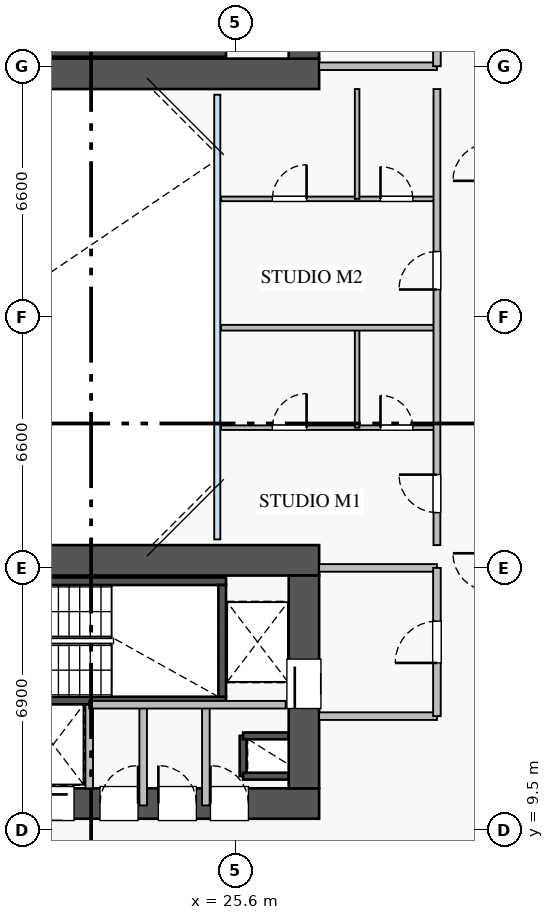
"""IFC4 building model, lengths in metres.
Left out: names, types, materials, properties, quantities, classifications, styles, units other than length and angle.
Written with IfcOpenShell. Run it as: python <this file> out.ifc"""

import sys

from ifc_helpers import new_model, si_unit, direction, frame, frame_2d, origin, place, context, subcontext, project, spatial, rectangle, extrude, source, transform, mapped, element, fill, save


model = new_model("IFC4")
c1 = context("Model", 3, precision=1e-05, world=origin(), true_north=direction((0.0, 1.0)))
c2 = subcontext(c1, "Body", "Model", "MODEL_VIEW")
j1 = project(units=[si_unit("LENGTHUNIT", "METRE"), si_unit("PLANEANGLEUNIT", "RADIAN")], contexts=[c1])
p1 = place(None, origin())
s1 = spatial("IfcSite", under=j1, at=p1, CompositionType="ELEMENT")
p2 = place(p1, origin())
s2 = spatial("IfcBuilding", under=s1, at=p2, CompositionType="ELEMENT")
p3 = place(p2, frame((0.0, 0.0, 23.0)))
s3 = spatial("IfcBuildingStorey", under=s2, at=p3, CompositionType="ELEMENT", Elevation=23.0)
p4 = place(p3, frame((25.8, 10.92, 0.0), z_axis=(0.0, 0.0, 1.0), x_axis=(0.0, 1.0, 0.0)))
e1 = element("IfcWall", 1, at=p4, inside=s3, PredefinedType="SHEAR", context=c2, shape_type="SweptSolid", body=[
    extrude(rectangle(XDim=1.06, YDim=0.18, at=frame_2d((0.53, 0.0))), origin(), (0.0, 0.0, 1.0), 3.07),
])
for number, where, z_axis, x_axis in (
    (2, (25.8, 11.98, 0.0), (0.0, 0.0, 1.0), (1.0, 0.0, 0.0)),
    (3, (25.8, 10.92, 0.0), (0.0, 0.0, 1.0), (1.0, 0.0, 0.0)),
):
    element("IfcWall", number, at=place(p3, frame(where, z_axis=z_axis, x_axis=x_axis)), inside=s3, PredefinedType="SHEAR", context=c2, shape_type="SweptSolid", body=[
        extrude(rectangle(XDim=1.2, YDim=0.18, at=frame_2d((0.6, 0.0))), origin(), (0.0, 0.0, 1.0), 3.07),
    ])
p5 = place(p3, frame((19.88, 12.8, 0.0), z_axis=(0.0, 0.0, 1.0), x_axis=(1.0, 0.0, 0.0)))
e4 = element("IfcWall", 4, at=p5, inside=s3, PredefinedType="SHEAR", context=c2, shape_type="SweptSolid", body=[
    extrude(rectangle(XDim=1.87, YDim=0.18, at=frame_2d((0.935, 0.0))), origin(), (0.0, 0.0, 1.0), 3.07),
])
p6 = place(p3, frame((18.2, 29.95, 0.0), z_axis=(0.0, 0.0, 1.0), x_axis=(1.0, 0.0, 0.0)))
e5 = element("IfcWall", 5, at=p6, inside=s3, PredefinedType="SHEAR", context=c2, shape_type="SweptSolid", body=[
    extrude(rectangle(XDim=7.15, YDim=0.2, at=frame_2d((3.575, 0.0))), origin(), (0.0, 0.0, 1.0), 3.25),
])
p7 = place(p3, frame((18.2, 12.91, 0.0), z_axis=(0.0, 0.0, 1.0), x_axis=(1.0, 0.0, 0.0)))
e6 = element("IfcWall", 6, at=p7, inside=s3, PredefinedType="SHEAR", context=c2, shape_type="SweptSolid", body=[
    extrude(rectangle(XDim=7.15, YDim=0.2, at=frame_2d((3.575, 0.0))), origin(), (0.0, 0.0, 1.0), 3.25),
])
p8 = place(p7, frame((0.35, 0.0, 0.0)))
e7 = element("IfcOpeningElement", 7, at=p8, cuts=e6, PredefinedType="OPENING", context=c2, shape_type="SweptSolid", body=[
    extrude(rectangle(XDim=1.1, YDim=2.05, at=frame_2d((0.55, 1.025))), frame((0.0, 0.11, 0.0), z_axis=(0.0, -1.0, 0.0), x_axis=(1.0, 0.0, 0.0)), (0.0, 0.0, 1.0), 0.22),
])
p9 = place(p3, frame((18.2, 16.05, 0.0), z_axis=(0.0, 0.0, 1.0), x_axis=(1.0, 0.0, 0.0)))
e8 = element("IfcWall", 8, at=p9, inside=s3, PredefinedType="SHEAR", context=c2, shape_type="SweptSolid", body=[
    extrude(rectangle(XDim=7.15, YDim=0.2, at=frame_2d((3.575, 0.0))), origin(), (0.0, 0.0, 1.0), 3.25),
])
p10 = place(p3, frame((25.25, 13.01, 0.0), z_axis=(0.0, 0.0, 1.0), x_axis=(0.0, 1.0, 0.0)))
e9 = element("IfcWall", 9, at=p10, inside=s3, PredefinedType="SHEAR", context=c2, shape_type="SweptSolid", body=[
    extrude(rectangle(XDim=2.94, YDim=0.2, at=frame_2d((1.47, 0.0))), origin(), (0.0, 0.0, 1.0), 3.25),
])
p11 = place(p3, frame((10.2, 29.4, 0.0), z_axis=(0.0, 0.0, 1.0), x_axis=(1.0, 0.0, 0.0)))
e10 = element("IfcWall", 10, at=p11, inside=s3, PredefinedType="SHEAR", context=c2, shape_type="SweptSolid", body=[
    extrude(rectangle(XDim=17.6, YDim=0.8, at=frame_2d((8.8, 0.0))), origin(), (0.0, 0.0, 1.0), 3.25),
])
p12 = place(p3, frame((27.4, 29.8, 0.0), z_axis=(0.0, 0.0, 1.0), x_axis=(0.0, 1.0, 0.0)))
e11 = element("IfcWall", 11, at=p12, inside=s3, PredefinedType="SHEAR", context=c2, shape_type="SweptSolid", body=[
    extrude(rectangle(XDim=5.6, YDim=0.8, at=frame_2d((2.8, 0.0))), origin(), (0.0, 0.0, 1.0), 3.25),
])
p13 = place(p12, frame((1.1, 0.0, 0.0)))
e12 = element("IfcOpeningElement", 12, at=p13, cuts=e11, PredefinedType="OPENING", context=c2, shape_type="SweptSolid", body=[
    extrude(rectangle(XDim=1.3, YDim=2.05, at=frame_2d((0.65, 1.025))), frame((0.0, 0.41, 0.0), z_axis=(0.0, -1.0, 0.0), x_axis=(1.0, 0.0, 0.0)), (0.0, 0.0, 1.0), 0.82),
])
p14 = place(p3, frame((10.2, 10.2, 0.0), z_axis=(0.0, 0.0, 1.0), x_axis=(1.0, 0.0, 0.0)))
e13 = element("IfcWall", 13, at=p14, inside=s3, PredefinedType="SHEAR", context=c2, shape_type="SweptSolid", body=[
    extrude(rectangle(XDim=17.6, YDim=0.8, at=frame_2d((8.8, 0.0))), origin(), (0.0, 0.0, 1.0), 3.25),
])
p15 = place(p14, frame((1.15, 0.0, 0.0)))
e14 = element("IfcOpeningElement", 14, at=p15, cuts=e13, PredefinedType="OPENING", context=c2, shape_type="SweptSolid", body=[
    extrude(rectangle(XDim=1.1, YDim=2.05, at=frame_2d((0.55, 1.025))), frame((0.0, 0.41, 0.0), z_axis=(0.0, -1.0, 0.0), x_axis=(1.0, 0.0, 0.0)), (0.0, 0.0, 1.0), 0.82),
])
p16 = place(p14, frame((8.3, 0.0, 0.0)))
e15 = element("IfcOpeningElement", 15, at=p16, cuts=e13, PredefinedType="OPENING", context=c2, shape_type="SweptSolid", body=[
    extrude(rectangle(XDim=1.1, YDim=2.05, at=frame_2d((0.55, 1.025))), frame((0.0, 0.41, 0.0), z_axis=(0.0, -1.0, 0.0), x_axis=(1.0, 0.0, 0.0)), (0.0, 0.0, 1.0), 0.82),
])
p17 = place(p14, frame((10.05, 0.0, 0.0)))
e16 = element("IfcOpeningElement", 16, at=p17, cuts=e13, PredefinedType="OPENING", context=c2, shape_type="SweptSolid", body=[
    extrude(rectangle(XDim=1.1, YDim=2.05, at=frame_2d((0.55, 1.025))), frame((0.0, 0.41, 0.0), z_axis=(0.0, -1.0, 0.0), x_axis=(1.0, 0.0, 0.0)), (0.0, 0.0, 1.0), 0.82),
])
p18 = place(p14, frame((14.74, 0.0, 0.0)))
e17 = element("IfcOpeningElement", 17, at=p18, cuts=e13, PredefinedType="OPENING", context=c2, shape_type="SweptSolid", body=[
    extrude(rectangle(XDim=1.0, YDim=2.05, at=frame_2d((0.5, 1.025))), frame((0.0, 0.41, 0.0), z_axis=(0.0, -1.0, 0.0), x_axis=(1.0, 0.0, 0.0)), (0.0, 0.0, 1.0), 0.82),
])
p19 = place(p14, frame((11.835, 0.0, 0.0)))
e18 = element("IfcOpeningElement", 18, at=p19, cuts=e13, PredefinedType="OPENING", context=c2, shape_type="SweptSolid", body=[
    extrude(rectangle(XDim=1.0, YDim=2.05, at=frame_2d((0.5, 1.025))), frame((0.0, 0.41, 0.0), z_axis=(0.0, -1.0, 0.0), x_axis=(1.0, 0.0, 0.0)), (0.0, 0.0, 1.0), 0.82),
])
p20 = place(p14, frame((13.37, 0.0, 0.0)))
e19 = element("IfcOpeningElement", 19, at=p20, cuts=e13, PredefinedType="OPENING", context=c2, shape_type="SweptSolid", body=[
    extrude(rectangle(XDim=1.0, YDim=2.05, at=frame_2d((0.5, 1.025))), frame((0.0, 0.41, 0.0), z_axis=(0.0, -1.0, 0.0), x_axis=(1.0, 0.0, 0.0)), (0.0, 0.0, 1.0), 0.82),
])
p21 = place(p3, frame((10.2, 16.6, 0.0), z_axis=(0.0, 0.0, 1.0), x_axis=(1.0, 0.0, 0.0)))
e20 = element("IfcWall", 20, at=p21, inside=s3, PredefinedType="SHEAR", context=c2, shape_type="SweptSolid", body=[
    extrude(rectangle(XDim=17.6, YDim=0.8, at=frame_2d((8.8, 0.0))), origin(), (0.0, 0.0, 1.0), 3.25),
])
p22 = place(p3, frame((27.4, 10.6, 0.0), z_axis=(0.0, 0.0, 1.0), x_axis=(0.0, 1.0, 0.0)))
e21 = element("IfcWall", 21, at=p22, inside=s3, PredefinedType="SHEAR", context=c2, shape_type="SweptSolid", body=[
    extrude(rectangle(XDim=5.6, YDim=0.8, at=frame_2d((2.8, 0.0))), origin(), (0.0, 0.0, 1.0), 3.25),
])
p23 = place(p22, frame((2.1, 0.0, 0.0)))
e22 = element("IfcOpeningElement", 22, at=p23, cuts=e21, PredefinedType="OPENING", context=c2, shape_type="SweptSolid", body=[
    extrude(rectangle(XDim=1.3, YDim=2.05, at=frame_2d((0.65, 1.025))), frame((0.0, 0.41, 0.0), z_axis=(0.0, -1.0, 0.0), x_axis=(1.0, 0.0, 0.0)), (0.0, 0.0, 1.0), 0.82),
])
p24 = place(p3, frame((27.8, 29.6, 0.0), z_axis=(0.0, 0.0, 1.0), x_axis=(1.0, 0.0, 0.0)))
e23 = element("IfcWall", 23, at=p24, inside=s3, PredefinedType="PARTITIONING", context=c2, shape_type="SweptSolid", body=[
    extrude(rectangle(XDim=3.1, YDim=0.2, at=frame_2d((1.55, 0.0))), origin(), (0.0, 0.0, 1.0), 3.07),
])
p25 = place(p3, frame((30.9, 29.6, 0.0), z_axis=(0.0, 0.0, 1.0), x_axis=(0.0, 1.0, 0.0)))
e24 = element("IfcWall", 24, at=p25, inside=s3, PredefinedType="PARTITIONING", context=c2, shape_type="SweptSolid", body=[
    extrude(rectangle(XDim=3.9, YDim=0.2, at=frame_2d((1.95, 0.0))), origin(), (0.0, 0.0, 1.0), 3.07),
])
p26 = place(p25, frame((1.4, 0.0, 0.0)))
e25 = element("IfcOpeningElement", 25, at=p26, cuts=e24, PredefinedType="OPENING", context=c2, shape_type="SweptSolid", body=[
    extrude(rectangle(XDim=1.1, YDim=2.05, at=frame_2d((0.55, 1.025))), frame((0.0, 0.11, 0.0), z_axis=(0.0, -1.0, 0.0), x_axis=(1.0, 0.0, 0.0)), (0.0, 0.0, 1.0), 0.22),
])
for number, where, z_axis, x_axis in (
    (26, (27.8, 16.4, 0.0), (0.0, 0.0, 1.0), (1.0, 0.0, 0.0)),
    (27, (27.8, 12.5, 0.0), (0.0, 0.0, 1.0), (1.0, 0.0, 0.0)),
):
    element("IfcWall", number, at=place(p3, frame(where, z_axis=z_axis, x_axis=x_axis)), inside=s3, PredefinedType="PARTITIONING", context=c2, shape_type="SweptSolid", body=[
        extrude(rectangle(XDim=3.1, YDim=0.2, at=frame_2d((1.55, 0.0))), origin(), (0.0, 0.0, 1.0), 3.07),
    ])
p27 = place(p3, frame((30.9, 12.5, 0.0), z_axis=(0.0, 0.0, 1.0), x_axis=(0.0, 1.0, 0.0)))
e28 = element("IfcWall", 28, at=p27, inside=s3, PredefinedType="PARTITIONING", context=c2, shape_type="SweptSolid", body=[
    extrude(rectangle(XDim=3.9, YDim=0.2, at=frame_2d((1.95, 0.0))), origin(), (0.0, 0.0, 1.0), 3.07),
])
p28 = place(p27, frame((1.4, 0.0, 0.0)))
e29 = element("IfcOpeningElement", 29, at=p28, cuts=e28, PredefinedType="OPENING", context=c2, shape_type="SweptSolid", body=[
    extrude(rectangle(XDim=1.1, YDim=2.05, at=frame_2d((0.55, 1.025))), frame((0.0, 0.11, 0.0), z_axis=(0.0, -1.0, 0.0), x_axis=(1.0, 0.0, 0.0)), (0.0, 0.0, 1.0), 0.22),
])
p29 = place(p3, frame((24.82, 10.15, 0.0), z_axis=(0.0, 0.0, 1.0), x_axis=(0.0, 1.0, 0.0)))
e30 = element("IfcWall", 30, at=p29, inside=s3, PredefinedType="PARTITIONING", context=c2, shape_type="SweptSolid", body=[
    extrude(rectangle(XDim=2.65, YDim=0.2, at=frame_2d((1.325, 0.0))), origin(), (0.0, 0.0, 1.0), 3.07),
])
p30 = place(p3, frame((21.75, 10.6, 0.0), z_axis=(0.0, 0.0, 1.0), x_axis=(0.0, 1.0, 0.0)))
e31 = element("IfcWall", 31, at=p30, inside=s3, PredefinedType="PARTITIONING", context=c2, shape_type="SweptSolid", body=[
    extrude(rectangle(XDim=2.2, YDim=0.2, at=frame_2d((1.1, 0.0))), origin(), (0.0, 0.0, 1.0), 3.07),
])
p31 = place(p3, frame((23.17, 10.15, 0.0), z_axis=(0.0, 0.0, 1.0), x_axis=(0.0, 1.0, 0.0)))
e32 = element("IfcWall", 32, at=p31, inside=s3, PredefinedType="PARTITIONING", context=c2, shape_type="SweptSolid", body=[
    extrude(rectangle(XDim=2.65, YDim=0.2, at=frame_2d((1.325, 0.0))), origin(), (0.0, 0.0, 1.0), 3.07),
])
p32 = place(p3, frame((21.75, 12.8, 0.0), z_axis=(0.0, 0.0, 1.0), x_axis=(1.0, 0.0, 0.0)))
e33 = element("IfcWall", 33, at=p32, inside=s3, PredefinedType="PARTITIONING", context=c2, shape_type="SweptSolid", body=[
    extrude(rectangle(XDim=5.17, YDim=0.2, at=frame_2d((2.585, 0.0))), origin(), (0.0, 0.0, 1.0), 3.07),
])
p33 = place(p3, frame((25.22, 20.09, 0.0), z_axis=(0.0, 0.0, 1.0), x_axis=(1.0, 0.0, 0.0)))
e34 = element("IfcWall", 34, at=p33, inside=s3, PredefinedType="PLUMBINGWALL", context=c2, shape_type="SweptSolid", body=[
    extrude(rectangle(XDim=5.68, YDim=0.12, at=frame_2d((2.84, 0.0))), origin(), (0.0, 0.0, 1.0), 2.625),
])
p34 = place(p33, frame((1.35, 0.0, 0.0)))
e35 = element("IfcOpeningElement", 35, at=p34, cuts=e34, PredefinedType="OPENING", context=c2, shape_type="SweptSolid", body=[
    extrude(rectangle(XDim=0.9, YDim=2.05, at=frame_2d((0.45, 1.025))), frame((0.0, 0.07, 0.0), z_axis=(0.0, -1.0, 0.0), x_axis=(1.0, 0.0, 0.0)), (0.0, 0.0, 1.0), 0.14),
])
p35 = place(p33, frame((4.195, 0.0, 0.0)))
e36 = element("IfcOpeningElement", 36, at=p35, cuts=e34, PredefinedType="OPENING", context=c2, shape_type="SweptSolid", body=[
    extrude(rectangle(XDim=0.85, YDim=2.05, at=frame_2d((0.425, 1.025))), frame((0.0, 0.07, 0.0), z_axis=(0.0, -1.0, 0.0), x_axis=(1.0, 0.0, 0.0)), (0.0, 0.0, 1.0), 0.14),
])
p36 = place(p3, frame((28.8, 20.09, 0.0), z_axis=(0.0, 0.0, 1.0), x_axis=(0.0, 1.0, 0.0)))
e37 = element("IfcWall", 37, at=p36, inside=s3, PredefinedType="PLUMBINGWALL", context=c2, shape_type="SweptSolid", body=[
    extrude(rectangle(XDim=2.63, YDim=0.12, at=frame_2d((1.315, 0.0))), origin(), (0.0, 0.0, 1.0), 3.07),
])
p37 = place(p3, frame((25.22, 26.11, 0.0), z_axis=(0.0, 0.0, 1.0), x_axis=(1.0, 0.0, 0.0)))
e38 = element("IfcWall", 38, at=p37, inside=s3, PredefinedType="PLUMBINGWALL", context=c2, shape_type="SweptSolid", body=[
    extrude(rectangle(XDim=5.68, YDim=0.12, at=frame_2d((2.84, 0.0))), origin(), (0.0, 0.0, 1.0), 2.625),
])
p38 = place(p37, frame((1.35, 0.0, 0.0)))
e39 = element("IfcOpeningElement", 39, at=p38, cuts=e38, PredefinedType="OPENING", context=c2, shape_type="SweptSolid", body=[
    extrude(rectangle(XDim=0.9, YDim=2.05, at=frame_2d((0.45, 1.025))), frame((0.0, 0.07, 0.0), z_axis=(0.0, -1.0, 0.0), x_axis=(1.0, 0.0, 0.0)), (0.0, 0.0, 1.0), 0.14),
])
p39 = place(p37, frame((4.195, 0.0, 0.0)))
e40 = element("IfcOpeningElement", 40, at=p39, cuts=e38, PredefinedType="OPENING", context=c2, shape_type="SweptSolid", body=[
    extrude(rectangle(XDim=0.85, YDim=2.05, at=frame_2d((0.425, 1.025))), frame((0.0, 0.07, 0.0), z_axis=(0.0, -1.0, 0.0), x_axis=(1.0, 0.0, 0.0)), (0.0, 0.0, 1.0), 0.14),
])
p40 = place(p3, frame((28.8, 26.11, 0.0), z_axis=(0.0, 0.0, 1.0), x_axis=(0.0, 1.0, 0.0)))
e41 = element("IfcWall", 41, at=p40, inside=s3, PredefinedType="PLUMBINGWALL", context=c2, shape_type="SweptSolid", body=[
    extrude(rectangle(XDim=2.89, YDim=0.12, at=frame_2d((1.445, 0.0))), origin(), (0.0, 0.0, 1.0), 3.07),
])
p41 = place(p3, frame((25.22, 22.72, 0.0), z_axis=(0.0, 0.0, 1.0), x_axis=(1.0, 0.0, 0.0)))
e42 = element("IfcWall", 42, at=p41, inside=s3, PredefinedType="PARTITIONING", context=c2, shape_type="SweptSolid", body=[
    extrude(rectangle(XDim=5.68, YDim=0.15, at=frame_2d((2.84, 0.0))), origin(), (0.0, 0.0, 1.0), 3.07),
])
p42 = place(p3, frame((30.9, 17.0, 0.0), z_axis=(0.0, 0.0, 1.0), x_axis=(0.0, 1.0, 0.0)))
e43 = element("IfcWall", 43, at=p42, inside=s3, PredefinedType="PARTITIONING", context=c2, shape_type="SweptSolid", body=[
    extrude(rectangle(XDim=12.0, YDim=0.18, at=frame_2d((6.0, 0.0))), origin(), (0.0, 0.0, 1.0), 3.07),
])
p43 = place(p42, frame((0.855, 0.0, 0.0)))
e44 = element("IfcOpeningElement", 44, at=p43, cuts=e43, PredefinedType="OPENING", context=c2, shape_type="SweptSolid", body=[
    extrude(rectangle(XDim=1.0, YDim=2.05, at=frame_2d((0.5, 1.025))), frame((0.0, 0.1, 0.0), z_axis=(0.0, -1.0, 0.0), x_axis=(1.0, 0.0, 0.0)), (0.0, 0.0, 1.0), 0.2),
])
p44 = place(p42, frame((6.725, 0.0, 0.0)))
e45 = element("IfcOpeningElement", 45, at=p44, cuts=e43, PredefinedType="OPENING", context=c2, shape_type="SweptSolid", body=[
    extrude(rectangle(XDim=1.0, YDim=2.05, at=frame_2d((0.5, 1.025))), frame((0.0, 0.1, 0.0), z_axis=(0.0, -1.0, 0.0), x_axis=(1.0, 0.0, 0.0)), (0.0, 0.0, 1.0), 0.2),
])
m1 = source(origin(), c2, "Body", "SweptSolid", [
    extrude(rectangle(XDim=1.3, YDim=2.05, at=frame_2d((0.65, 1.025))), frame((0.0, 0.025, 0.0), z_axis=(0.0, -1.0, 0.0), x_axis=(1.0, 0.0, 0.0)), (0.0, 0.0, 1.0), 0.05),
])
p45 = place(p23, origin())
e46 = element("IfcDoor", 46, at=p45, inside=s3, OperationType="SLIDING_TO_RIGHT", PredefinedType="DOOR", context=c2, shape_type="MappedRepresentation", body=[
    mapped(m1, transform((0.0, 0.0, 0.0), x_axis=(1.0, 0.0, 0.0), y_axis=(0.0, 1.0, 0.0), z_axis=(0.0, 0.0, 1.0), scale=1.0)),
])
fill(e22, e46)
m2 = source(origin(), c2, "Body", "SweptSolid", [
    extrude(rectangle(XDim=1.1, YDim=2.05, at=frame_2d((0.55, 1.025))), frame((0.0, 0.025, 0.0), z_axis=(0.0, -1.0, 0.0), x_axis=(1.0, 0.0, 0.0)), (0.0, 0.0, 1.0), 0.05),
])
p46 = place(p17, origin())
e47 = element("IfcDoor", 47, at=p46, inside=s3, OperationType="SLIDING_TO_RIGHT", PredefinedType="DOOR", context=c2, shape_type="MappedRepresentation", body=[
    mapped(m2, transform((0.0, 0.0, 0.0), x_axis=(1.0, 0.0, 0.0), y_axis=(0.0, 1.0, 0.0), z_axis=(0.0, 0.0, 1.0), scale=1.0)),
])
fill(e16, e47)
m3 = source(origin(), c2, "Body", "SweptSolid", [
    extrude(rectangle(XDim=1.0, YDim=2.05, at=frame_2d((0.5, 1.025))), frame((0.0, 0.025, 0.0), z_axis=(0.0, -1.0, 0.0), x_axis=(1.0, 0.0, 0.0)), (0.0, 0.0, 1.0), 0.05),
])
p47 = place(p18, origin())
e48 = element("IfcDoor", 48, at=p47, inside=s3, OperationType="SINGLE_SWING_LEFT", PredefinedType="DOOR", context=c2, shape_type="MappedRepresentation", body=[
    mapped(m3, transform((0.0, 0.0, 0.0), x_axis=(1.0, 0.0, 0.0), y_axis=(0.0, 1.0, 0.0), z_axis=(0.0, 0.0, 1.0), scale=1.0)),
])
fill(e17, e48)
p48 = place(p19, origin())
e49 = element("IfcDoor", 49, at=p48, inside=s3, OperationType="SINGLE_SWING_RIGHT", PredefinedType="DOOR", context=c2, shape_type="MappedRepresentation", body=[
    mapped(m3, transform((0.0, 0.0, 0.0), x_axis=(1.0, 0.0, 0.0), y_axis=(0.0, 1.0, 0.0), z_axis=(0.0, 0.0, 1.0), scale=1.0)),
])
fill(e18, e49)
p49 = place(p20, origin())
e50 = element("IfcDoor", 50, at=p49, inside=s3, OperationType="SINGLE_SWING_LEFT", PredefinedType="DOOR", context=c2, shape_type="MappedRepresentation", body=[
    mapped(m3, transform((0.0, 0.0, 0.0), x_axis=(1.0, 0.0, 0.0), y_axis=(0.0, 1.0, 0.0), z_axis=(0.0, 0.0, 1.0), scale=1.0)),
])
fill(e19, e50)
p50 = place(p28, origin())
e51 = element("IfcDoor", 51, at=p50, inside=s3, OperationType="SINGLE_SWING_LEFT", PredefinedType="DOOR", context=c2, shape_type="MappedRepresentation", body=[
    mapped(m2, transform((0.0, 0.0, 0.0), x_axis=(1.0, 0.0, 0.0), y_axis=(0.0, 1.0, 0.0), z_axis=(0.0, 0.0, 1.0), scale=1.0)),
])
fill(e29, e51)
m4 = source(origin(), c2, "Body", "SweptSolid", [
    extrude(rectangle(XDim=0.9, YDim=2.05, at=frame_2d((0.45, 1.025))), frame((0.0, 0.025, 0.0), z_axis=(0.0, -1.0, 0.0), x_axis=(1.0, 0.0, 0.0)), (0.0, 0.0, 1.0), 0.05),
])
p51 = place(p34, origin())
e52 = element("IfcDoor", 52, at=p51, inside=s3, OperationType="SINGLE_SWING_RIGHT", PredefinedType="DOOR", context=c2, shape_type="MappedRepresentation", body=[
    mapped(m4, transform((0.0, 0.0, 0.0), x_axis=(1.0, 0.0, 0.0), y_axis=(0.0, 1.0, 0.0), z_axis=(0.0, 0.0, 1.0), scale=1.0)),
])
fill(e35, e52)
m5 = source(origin(), c2, "Body", "SweptSolid", [
    extrude(rectangle(XDim=0.85, YDim=2.05, at=frame_2d((0.425, 1.025))), frame((0.0, 0.025, 0.0), z_axis=(0.0, -1.0, 0.0), x_axis=(1.0, 0.0, 0.0)), (0.0, 0.0, 1.0), 0.05),
])
p52 = place(p35, origin())
e53 = element("IfcDoor", 53, at=p52, inside=s3, OperationType="SINGLE_SWING_LEFT", PredefinedType="DOOR", context=c2, shape_type="MappedRepresentation", body=[
    mapped(m5, transform((0.0, 0.0, 0.0), x_axis=(1.0, 0.0, 0.0), y_axis=(0.0, 1.0, 0.0), z_axis=(0.0, 0.0, 1.0), scale=1.0)),
])
fill(e36, e53)
p53 = place(p38, origin())
e54 = element("IfcDoor", 54, at=p53, inside=s3, OperationType="SINGLE_SWING_RIGHT", PredefinedType="DOOR", context=c2, shape_type="MappedRepresentation", body=[
    mapped(m4, transform((0.0, 0.0, 0.0), x_axis=(1.0, 0.0, 0.0), y_axis=(0.0, 1.0, 0.0), z_axis=(0.0, 0.0, 1.0), scale=1.0)),
])
fill(e39, e54)
p54 = place(p39, origin())
e55 = element("IfcDoor", 55, at=p54, inside=s3, OperationType="SINGLE_SWING_LEFT", PredefinedType="DOOR", context=c2, shape_type="MappedRepresentation", body=[
    mapped(m5, transform((0.0, 0.0, 0.0), x_axis=(1.0, 0.0, 0.0), y_axis=(0.0, 1.0, 0.0), z_axis=(0.0, 0.0, 1.0), scale=1.0)),
])
fill(e40, e55)
p55 = place(p43, origin())
e56 = element("IfcDoor", 56, at=p55, inside=s3, OperationType="SINGLE_SWING_RIGHT", PredefinedType="DOOR", context=c2, shape_type="MappedRepresentation", body=[
    mapped(m3, transform((0.0, 0.0, 0.0), x_axis=(1.0, 0.0, 0.0), y_axis=(0.0, 1.0, 0.0), z_axis=(0.0, 0.0, 1.0), scale=1.0)),
])
fill(e44, e56)
p56 = place(p44, origin())
e57 = element("IfcDoor", 57, at=p56, inside=s3, OperationType="SINGLE_SWING_LEFT", PredefinedType="DOOR", context=c2, shape_type="MappedRepresentation", body=[
    mapped(m3, transform((0.0, 0.0, 0.0), x_axis=(1.0, 0.0, 0.0), y_axis=(0.0, 1.0, 0.0), z_axis=(0.0, 0.0, 1.0), scale=1.0)),
])
fill(e45, e57)
save(model, sys.argv[1])
